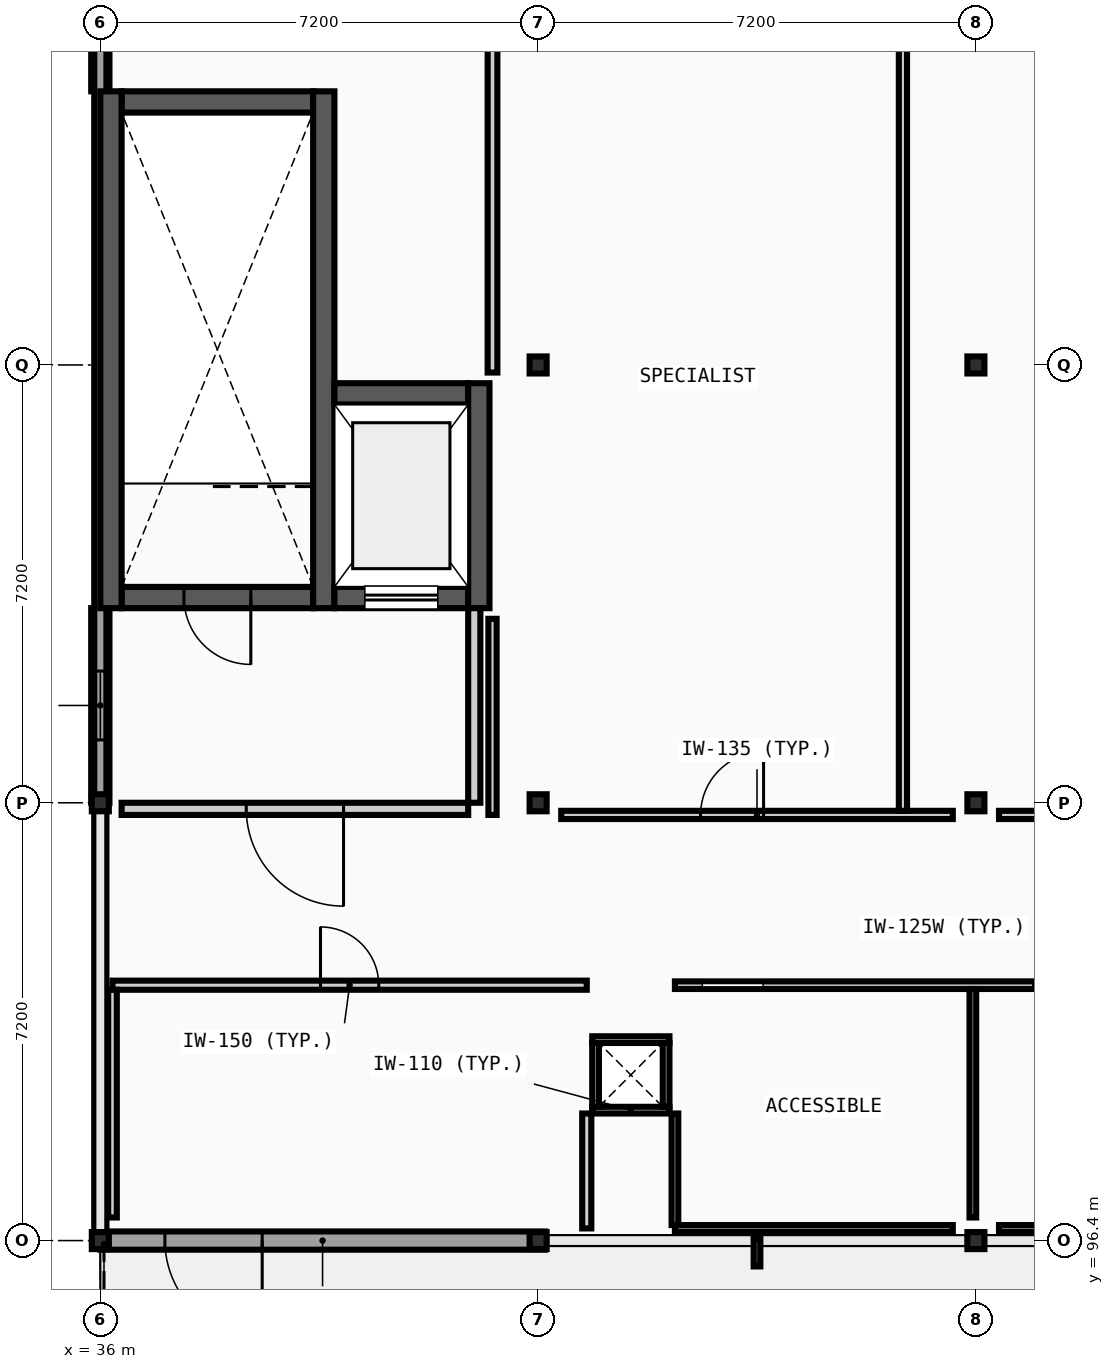
"""IFC4 building model, lengths in metres.
Left out: names, types, materials, properties, quantities, classifications, styles, units other than length and angle.
Written with IfcOpenShell. Run it as: python <this file> out.ifc"""

import sys

from ifc_helpers import new_model, si_unit, direction, frame, frame_2d, origin, origin_2d, place, context, subcontext, project, spatial, rectangle, i_section, extrude, element, fill, save


model = new_model("IFC4")
c1 = context("Model", 3, precision=1e-05, world=origin(), true_north=direction((0.0, 1.0)))
c2 = subcontext(c1, "Body", "Model", "MODEL_VIEW")
j1 = project(units=[si_unit("LENGTHUNIT", "METRE"), si_unit("PLANEANGLEUNIT", "RADIAN")], contexts=[c1])
p1 = place(None, origin())
s1 = spatial("IfcSite", under=j1, at=p1, CompositionType="ELEMENT")
p2 = place(p1, origin())
s2 = spatial("IfcBuilding", under=s1, at=p2, CompositionType="ELEMENT")
p3 = place(p2, frame((0.0, 0.0, 22.8)))
s3 = spatial("IfcBuildingStorey", under=s2, at=p3, CompositionType="ELEMENT", Elevation=22.8)
for number, where, z_axis, x_axis in (
    (1, (36.0, 96.4, 0.0), (0.0, 0.0, 1.0), (1.0, 0.0, 0.0)),
    (2, (36.0, 103.6, 0.0), (0.0, 0.0, 1.0), (1.0, 0.0, 0.0)),
    (3, (43.2, 96.4, 0.0), (0.0, 0.0, 1.0), (1.0, 0.0, 0.0)),
    (4, (43.2, 103.6, 0.0), (0.0, 0.0, 1.0), (1.0, 0.0, 0.0)),
    (5, (43.2, 110.8, 0.0), (0.0, 0.0, 1.0), (1.0, 0.0, 0.0)),
    (6, (50.4, 96.4, 0.0), (0.0, 0.0, 1.0), (1.0, 0.0, 0.0)),
    (7, (50.4, 103.6, 0.0), (0.0, 0.0, 1.0), (1.0, 0.0, 0.0)),
    (8, (50.4, 110.8, 0.0), (0.0, 0.0, 1.0), (1.0, 0.0, 0.0)),
):
    element("IfcColumn", number, at=place(p3, frame(where, z_axis=z_axis, x_axis=x_axis)), inside=s3, PredefinedType="COLUMN", context=c2, shape_type="SweptSolid", body=[
        extrude(i_section(OverallWidth=0.28, OverallDepth=0.28, WebThickness=0.01, FlangeThickness=0.018, FilletRadius=0.024, at=origin_2d()), origin(), (0.0, 0.0, 1.0), 4.4),
    ])
p4 = place(p3, frame((36.0, 96.4, 0.0), z_axis=(0.0, 0.0, 1.0), x_axis=(1.0, 0.0, 0.0)))
e9 = element("IfcWall", 9, at=p4, inside=s3, PredefinedType="STANDARD", context=c2, shape_type="SweptSolid", body=[
    extrude(rectangle(XDim=7.31, YDim=0.3, at=frame_2d((3.655, 0.0))), origin(), (0.0, 0.0, 1.0), 4.035),
])
p5 = place(p4, frame((1.062, 0.0, 0.0)))
e10 = element("IfcOpeningElement", 10, at=p5, cuts=e9, PredefinedType="OPENING", context=c2, shape_type="SweptSolid", body=[
    extrude(rectangle(XDim=1.6, YDim=2.2, at=frame_2d((0.8, 1.1))), frame((0.0, 0.16, 0.0), z_axis=(0.0, -1.0, 0.0), x_axis=(1.0, 0.0, 0.0)), (0.0, 0.0, 1.0), 0.32),
])
p6 = place(p3, frame((36.0, 106.8, 0.0), z_axis=(0.0, 0.0, 1.0), x_axis=(0.0, -1.0, 0.0)))
e11 = element("IfcWall", 11, at=p6, inside=s3, PredefinedType="STANDARD", context=c2, shape_type="SweptSolid", body=[
    extrude(rectangle(XDim=3.2, YDim=0.3, at=frame_2d((1.6, 0.0))), origin(), (0.0, 0.0, 1.0), 4.11),
])
p7 = place(p6, frame((1.034, 0.0, 0.95)))
e12 = element("IfcOpeningElement", 12, at=p7, cuts=e11, PredefinedType="OPENING", context=c2, shape_type="SweptSolid", body=[
    extrude(rectangle(XDim=1.132, YDim=1.296, at=frame_2d((0.566, 0.648))), frame((0.0, 0.16, 0.0), z_axis=(0.0, -1.0, 0.0), x_axis=(1.0, 0.0, 0.0)), (0.0, 0.0, 1.0), 0.32),
])
p8 = place(p3, frame((36.0, 117.85, 0.0), z_axis=(0.0, 0.0, 1.0), x_axis=(0.0, -1.0, 0.0)))
e13 = element("IfcWall", 13, at=p8, inside=s3, PredefinedType="STANDARD", context=c2, shape_type="SweptSolid", body=[
    extrude(rectangle(XDim=2.55, YDim=0.3, at=frame_2d((1.275, 0.0))), origin(), (0.0, 0.0, 1.0), 4.11),
])
p9 = place(p3, frame((36.0, 96.6, 4.4), z_axis=(0.0, 0.0, 1.0), x_axis=(0.0, 1.0, 0.0)))
e14 = element("IfcWall", 14, at=p9, inside=s3, PredefinedType="PARAPET", context=c2, shape_type="SweptSolid", body=[
    extrude(rectangle(XDim=21.2, YDim=0.2, at=frame_2d((10.6, 0.0))), origin(), (0.0, 0.0, 1.0), 0.55),
])
p10 = place(p3, frame((36.35, 106.975, 0.0), z_axis=(0.0, 0.0, 1.0), x_axis=(1.0, 0.0, 0.0)))
e15 = element("IfcWall", 15, at=p10, inside=s3, PredefinedType="SHEAR", context=c2, shape_type="SweptSolid", body=[
    extrude(rectangle(XDim=3.15, YDim=0.35, at=frame_2d((1.575, 0.0))), origin(), (0.0, 0.0, 1.0), 4.18),
])
p11 = place(p10, frame((1.025, 0.0, 0.0)))
e16 = element("IfcOpeningElement", 16, at=p11, cuts=e15, PredefinedType="OPENING", context=c2, shape_type="SweptSolid", body=[
    extrude(rectangle(XDim=1.1, YDim=2.15, at=frame_2d((0.55, 1.075))), frame((0.0, 0.185, 0.0), z_axis=(0.0, -1.0, 0.0), x_axis=(1.0, 0.0, 0.0)), (0.0, 0.0, 1.0), 0.37),
])
p12 = place(p3, frame((36.35, 115.125, 0.0), z_axis=(0.0, 0.0, 1.0), x_axis=(1.0, 0.0, 0.0)))
e17 = element("IfcWall", 17, at=p12, inside=s3, PredefinedType="SHEAR", context=c2, shape_type="SweptSolid", body=[
    extrude(rectangle(XDim=3.15, YDim=0.35, at=frame_2d((1.575, 0.0))), origin(), (0.0, 0.0, 1.0), 4.18),
])
for number, where, z_axis, x_axis in (
    (18, (36.175, 106.8, 0.0), (0.0, 0.0, 1.0), (0.0, 1.0, 0.0)),
    (19, (39.675, 106.8, 0.0), (0.0, 0.0, 1.0), (0.0, 1.0, 0.0)),
):
    element("IfcWall", number, at=place(p3, frame(where, z_axis=z_axis, x_axis=x_axis)), inside=s3, PredefinedType="SHEAR", context=c2, shape_type="SweptSolid", body=[
        extrude(rectangle(XDim=8.5, YDim=0.35, at=frame_2d((4.25, 0.0))), origin(), (0.0, 0.0, 1.0), 4.18),
    ])
p13 = place(p3, frame((39.85, 106.975, 0.0), z_axis=(0.0, 0.0, 1.0), x_axis=(1.0, 0.0, 0.0)))
e20 = element("IfcWall", 20, at=p13, inside=s3, PredefinedType="SHEAR", context=c2, shape_type="SweptSolid", body=[
    extrude(rectangle(XDim=2.2, YDim=0.35, at=frame_2d((1.1, 0.0))), origin(), (0.0, 0.0, 1.0), 4.18),
])
p14 = place(p13, frame((0.5, 0.0, 0.0)))
e21 = element("IfcOpeningElement", 21, at=p14, cuts=e20, PredefinedType="OPENING", context=c2, shape_type="SweptSolid", body=[
    extrude(rectangle(XDim=1.2, YDim=2.2, at=frame_2d((0.6, 1.1))), frame((0.0, 0.185, 0.0), z_axis=(0.0, -1.0, 0.0), x_axis=(1.0, 0.0, 0.0)), (0.0, 0.0, 1.0), 0.37),
])
p15 = place(p3, frame((39.85, 110.325, 0.0), z_axis=(0.0, 0.0, 1.0), x_axis=(1.0, 0.0, 0.0)))
e22 = element("IfcWall", 22, at=p15, inside=s3, PredefinedType="SHEAR", context=c2, shape_type="SweptSolid", body=[
    extrude(rectangle(XDim=2.2, YDim=0.35, at=frame_2d((1.1, 0.0))), origin(), (0.0, 0.0, 1.0), 4.18),
])
p16 = place(p3, frame((42.225, 106.8, 0.0), z_axis=(0.0, 0.0, 1.0), x_axis=(0.0, 1.0, 0.0)))
e23 = element("IfcWall", 23, at=p16, inside=s3, PredefinedType="SHEAR", context=c2, shape_type="SweptSolid", body=[
    extrude(rectangle(XDim=3.7, YDim=0.35, at=frame_2d((1.85, 0.0))), origin(), (0.0, 0.0, 1.0), 4.18),
])
p17 = place(p3, frame((36.35, 103.5, 0.0), z_axis=(0.0, 0.0, 1.0), x_axis=(1.0, 0.0, 0.0)))
e24 = element("IfcWall", 24, at=p17, inside=s3, PredefinedType="PARTITIONING", context=c2, shape_type="SweptSolid", body=[
    extrude(rectangle(XDim=5.7, YDim=0.2, at=frame_2d((2.85, 0.0))), origin(), (0.0, 0.0, 1.0), 4.035),
])
p18 = place(p17, frame((2.05, 0.0, 0.0)))
e25 = element("IfcOpeningElement", 25, at=p18, cuts=e24, PredefinedType="OPENING", context=c2, shape_type="SweptSolid", body=[
    extrude(rectangle(XDim=1.6, YDim=2.2, at=frame_2d((0.8, 1.1))), frame((0.0, 0.11, 0.0), z_axis=(0.0, -1.0, 0.0), x_axis=(1.0, 0.0, 0.0)), (0.0, 0.0, 1.0), 0.22),
])
p19 = place(p3, frame((42.15, 103.6, 0.0), z_axis=(0.0, 0.0, 1.0), x_axis=(0.0, 1.0, 0.0)))
e26 = element("IfcWall", 26, at=p19, inside=s3, PredefinedType="PARTITIONING", context=c2, shape_type="SweptSolid", body=[
    extrude(rectangle(XDim=3.2, YDim=0.2, at=frame_2d((1.6, 0.0))), origin(), (0.0, 0.0, 1.0), 4.18),
])
for number, where, z_axis, x_axis in (
    (27, (44.09, 98.545, 0.0), (0.0, 0.0, 1.0), (1.0, 0.0, 0.0)),
    (28, (44.09, 99.705, 0.0), (0.0, 0.0, 1.0), (1.0, 0.0, 0.0)),
):
    element("IfcWall", number, at=place(p3, frame(where, z_axis=z_axis, x_axis=x_axis)), inside=s3, PredefinedType="PARTITIONING", context=c2, shape_type="SweptSolid", body=[
        extrude(rectangle(XDim=1.27, YDim=0.11, at=frame_2d((0.635, 0.0))), origin(), (0.0, 0.0, 1.0), 4.18),
    ])
for number, where, z_axis, x_axis in (
    (29, (44.145, 98.6, 0.0), (0.0, 0.0, 1.0), (0.0, 1.0, 0.0)),
    (30, (45.305, 98.6, 0.0), (0.0, 0.0, 1.0), (0.0, 1.0, 0.0)),
):
    element("IfcWall", number, at=place(p3, frame(where, z_axis=z_axis, x_axis=x_axis)), inside=s3, PredefinedType="PARTITIONING", context=c2, shape_type="SweptSolid", body=[
        extrude(rectangle(XDim=1.05, YDim=0.11, at=frame_2d((0.525, 0.0))), origin(), (0.0, 0.0, 1.0), 4.18),
    ])
p20 = place(p3, frame((45.45, 96.6, 0.0), z_axis=(0.0, 0.0, 1.0), x_axis=(1.0, 0.0, 0.0)))
e31 = element("IfcWall", 31, at=p20, inside=s3, PredefinedType="PARTITIONING", context=c2, shape_type="SweptSolid", body=[
    extrude(rectangle(XDim=4.57, YDim=0.11, at=frame_2d((2.285, 0.0))), origin(), (0.0, 0.0, 1.0), 4.035),
])
p21 = place(p3, frame((50.78, 96.6, 0.0), z_axis=(0.0, 0.0, 1.0), x_axis=(1.0, 0.0, 0.0)))
e32 = element("IfcWall", 32, at=p21, inside=s3, PredefinedType="PARTITIONING", context=c2, shape_type="SweptSolid", body=[
    extrude(rectangle(XDim=6.44, YDim=0.11, at=frame_2d((3.22, 0.0))), origin(), (0.0, 0.0, 1.0), 4.035),
])
p22 = place(p3, frame((36.2, 100.6, 0.0), z_axis=(0.0, 0.0, 1.0), x_axis=(1.0, 0.0, 0.0)))
e33 = element("IfcWall", 33, at=p22, inside=s3, PredefinedType="PARTITIONING", context=c2, shape_type="SweptSolid", body=[
    extrude(rectangle(XDim=7.8, YDim=0.15, at=frame_2d((3.9, 0.0))), origin(), (0.0, 0.0, 1.0), 4.18),
])
p23 = place(p22, frame((3.421, 0.0, 0.0)))
e34 = element("IfcOpeningElement", 34, at=p23, cuts=e33, PredefinedType="OPENING", context=c2, shape_type="SweptSolid", body=[
    extrude(rectangle(XDim=0.958, YDim=2.096, at=frame_2d((0.479, 1.048))), frame((0.0, 0.085, 0.0), z_axis=(0.0, -1.0, 0.0), x_axis=(1.0, 0.0, 0.0)), (0.0, 0.0, 1.0), 0.17),
])
p24 = place(p3, frame((45.45, 100.6, 0.0), z_axis=(0.0, 0.0, 1.0), x_axis=(1.0, 0.0, 0.0)))
e35 = element("IfcWall", 35, at=p24, inside=s3, PredefinedType="PARTITIONING", context=c2, shape_type="SweptSolid", body=[
    extrude(rectangle(XDim=19.15, YDim=0.125, at=frame_2d((9.575, 0.0))), origin(), (0.0, 0.0, 1.0), 4.18),
])
p25 = place(p24, frame((0.45, 0.0, 0.0)))
e36 = element("IfcOpeningElement", 36, at=p25, cuts=e35, PredefinedType="OPENING", context=c2, shape_type="SweptSolid", body=[
    extrude(rectangle(XDim=1.0, YDim=2.1, at=frame_2d((0.5, 1.05))), frame((0.0, 0.073, 0.0), z_axis=(0.0, -1.0, 0.0), x_axis=(1.0, 0.0, 0.0)), (0.0, 0.0, 1.0), 0.145),
])
p26 = place(p24, frame((7.675, 0.0, 0.0)))
e37 = element("IfcOpeningElement", 37, at=p26, cuts=e35, PredefinedType="OPENING", context=c2, shape_type="SweptSolid", body=[
    extrude(rectangle(XDim=0.9, YDim=2.1, at=frame_2d((0.45, 1.05))), frame((0.0, 0.073, 0.0), z_axis=(0.0, -1.0, 0.0), x_axis=(1.0, 0.0, 0.0)), (0.0, 0.0, 1.0), 0.145),
])
p27 = place(p24, frame((14.758, 0.0, 0.0)))
e38 = element("IfcOpeningElement", 38, at=p27, cuts=e35, PredefinedType="OPENING", context=c2, shape_type="SweptSolid", body=[
    extrude(rectangle(XDim=0.984, YDim=2.096, at=frame_2d((0.492, 1.048))), frame((0.0, 0.073, 0.0), z_axis=(0.0, -1.0, 0.0), x_axis=(1.0, 0.0, 0.0)), (0.0, 0.0, 1.0), 0.145),
])
p28 = place(p3, frame((43.58, 103.4, 0.0), z_axis=(0.0, 0.0, 1.0), x_axis=(1.0, 0.0, 0.0)))
e39 = element("IfcWall", 39, at=p28, inside=s3, PredefinedType="PARTITIONING", context=c2, shape_type="SweptSolid", body=[
    extrude(rectangle(XDim=6.44, YDim=0.135, at=frame_2d((3.22, 0.0))), origin(), (0.0, 0.0, 1.0), 4.035),
])
p29 = place(p28, frame((2.292, 0.0, 0.0)))
e40 = element("IfcOpeningElement", 40, at=p29, cuts=e39, PredefinedType="OPENING", context=c2, shape_type="SweptSolid", body=[
    extrude(rectangle(XDim=1.036, YDim=2.096, at=frame_2d((0.518, 1.048))), frame((0.0, 0.078, 0.0), z_axis=(0.0, -1.0, 0.0), x_axis=(1.0, 0.0, 0.0)), (0.0, 0.0, 1.0), 0.155),
])
p30 = place(p3, frame((50.78, 103.4, 0.0), z_axis=(0.0, 0.0, 1.0), x_axis=(1.0, 0.0, 0.0)))
e41 = element("IfcWall", 41, at=p30, inside=s3, PredefinedType="PARTITIONING", context=c2, shape_type="SweptSolid", body=[
    extrude(rectangle(XDim=6.44, YDim=0.135, at=frame_2d((3.22, 0.0))), origin(), (0.0, 0.0, 1.0), 4.035),
])
p31 = place(p30, frame((4.105, 0.0, 0.0)))
e42 = element("IfcOpeningElement", 42, at=p31, cuts=e41, PredefinedType="OPENING", context=c2, shape_type="SweptSolid", body=[
    extrude(rectangle(XDim=1.8, YDim=2.3, at=frame_2d((0.9, 1.15))), frame((0.0, 0.078, 0.0), z_axis=(0.0, -1.0, 0.0), x_axis=(1.0, 0.0, 0.0)), (0.0, 0.0, 1.0), 0.155),
])
p32 = place(p30, frame((2.11, 0.0, 0.0)))
e43 = element("IfcOpeningElement", 43, at=p32, cuts=e41, PredefinedType="OPENING", context=c2, shape_type="SweptSolid", body=[
    extrude(rectangle(XDim=1.01, YDim=2.096, at=frame_2d((0.505, 1.048))), frame((0.0, 0.078, 0.0), z_axis=(0.0, -1.0, 0.0), x_axis=(1.0, 0.0, 0.0)), (0.0, 0.0, 1.0), 0.155),
])
p33 = place(p3, frame((36.2, 96.78, 0.0), z_axis=(0.0, 0.0, 1.0), x_axis=(0.0, 1.0, 0.0)))
e44 = element("IfcWall", 44, at=p33, inside=s3, PredefinedType="PARTITIONING", context=c2, shape_type="SweptSolid", body=[
    extrude(rectangle(XDim=3.745, YDim=0.142, at=frame_2d((1.873, 0.0))), origin(), (0.0, 0.0, 1.0), 4.11),
])
p34 = place(p3, frame((42.45, 103.4, 0.0), z_axis=(0.0, 0.0, 1.0), x_axis=(0.0, 1.0, 0.0)))
e45 = element("IfcWall", 45, at=p34, inside=s3, PredefinedType="PARTITIONING", context=c2, shape_type="SweptSolid", body=[
    extrude(rectangle(XDim=3.225, YDim=0.135, at=frame_2d((1.613, 0.0))), origin(), (0.0, 0.0, 1.0), 4.18),
])
p35 = place(p3, frame((42.45, 110.675, 0.0), z_axis=(0.0, 0.0, 1.0), x_axis=(0.0, 1.0, 0.0)))
e46 = element("IfcWall", 46, at=p35, inside=s3, PredefinedType="PARTITIONING", context=c2, shape_type="SweptSolid", body=[
    extrude(rectangle(XDim=7.125, YDim=0.16, at=frame_2d((3.562, 0.0))), origin(), (0.0, 0.0, 1.0), 4.18),
])
p36 = place(p3, frame((44.0, 96.6, 0.0), z_axis=(0.0, 0.0, 1.0), x_axis=(0.0, 1.0, 0.0)))
e47 = element("IfcWall", 47, at=p36, inside=s3, PredefinedType="PARTITIONING", context=c2, shape_type="SweptSolid", body=[
    extrude(rectangle(XDim=1.89, YDim=0.15, at=frame_2d((0.945, 0.0))), origin(), (0.0, 0.0, 1.0), 4.18),
])
p37 = place(p3, frame((45.45, 96.655, 0.0), z_axis=(0.0, 0.0, 1.0), x_axis=(0.0, 1.0, 0.0)))
e48 = element("IfcWall", 48, at=p37, inside=s3, PredefinedType="PARTITIONING", context=c2, shape_type="SweptSolid", body=[
    extrude(rectangle(XDim=1.835, YDim=0.11, at=frame_2d((0.917, 0.0))), origin(), (0.0, 0.0, 1.0), 4.18),
])
p38 = place(p3, frame((49.2, 103.468, 0.0), z_axis=(0.0, 0.0, 1.0), x_axis=(0.0, 1.0, 0.0)))
e49 = element("IfcWall", 49, at=p38, inside=s3, PredefinedType="PARTITIONING", context=c2, shape_type="SweptSolid", body=[
    extrude(rectangle(XDim=14.333, YDim=0.135, at=frame_2d((7.166, 0.0))), origin(), (0.0, 0.0, 1.0), 4.18),
])
p39 = place(p3, frame((50.35, 96.78, 0.0), z_axis=(0.0, 0.0, 1.0), x_axis=(0.0, 1.0, 0.0)))
e50 = element("IfcWall", 50, at=p39, inside=s3, PredefinedType="PARTITIONING", context=c2, shape_type="SweptSolid", body=[
    extrude(rectangle(XDim=3.758, YDim=0.11, at=frame_2d((1.879, 0.0))), origin(), (0.0, 0.0, 1.0), 4.18),
])
p40 = place(p7, origin())
e51 = element("IfcWindow", 51, at=p40, inside=s3, PartitioningType="SINGLE_PANEL", PredefinedType="WINDOW", context=c2, shape_type="SweptSolid", body=[
    extrude(rectangle(XDim=1.132, YDim=1.296, at=frame_2d((0.566, 0.648))), frame((0.0, 0.03, 0.0), z_axis=(0.0, -1.0, 0.0), x_axis=(1.0, 0.0, 0.0)), (0.0, 0.0, 1.0), 0.06),
])
fill(e12, e51)
p41 = place(p5, origin())
e52 = element("IfcDoor", 52, at=p41, inside=s3, OperationType="DOUBLE_DOOR_SINGLE_SWING", PredefinedType="DOOR", context=c2, shape_type="SweptSolid", body=[
    extrude(rectangle(XDim=1.6, YDim=2.2, at=frame_2d((0.8, 1.1))), frame((0.0, 0.025, 0.0), z_axis=(0.0, -1.0, 0.0), x_axis=(1.0, 0.0, 0.0)), (0.0, 0.0, 1.0), 0.05),
])
fill(e10, e52)
p42 = place(p11, origin())
e53 = element("IfcDoor", 53, at=p42, inside=s3, OperationType="SINGLE_SWING_RIGHT", PredefinedType="DOOR", context=c2, shape_type="SweptSolid", body=[
    extrude(rectangle(XDim=1.1, YDim=2.15, at=frame_2d((0.55, 1.075))), frame((0.0, 0.025, 0.0), z_axis=(0.0, -1.0, 0.0), x_axis=(1.0, 0.0, 0.0)), (0.0, 0.0, 1.0), 0.05),
])
fill(e16, e53)
p43 = place(p14, origin())
e54 = element("IfcDoor", 54, at=p43, inside=s3, OperationType="SLIDING_TO_RIGHT", PredefinedType="DOOR", context=c2, shape_type="SweptSolid", body=[
    extrude(rectangle(XDim=1.2, YDim=2.2, at=frame_2d((0.6, 1.1))), frame((0.0, 0.025, 0.0), z_axis=(0.0, -1.0, 0.0), x_axis=(1.0, 0.0, 0.0)), (0.0, 0.0, 1.0), 0.05),
])
fill(e21, e54)
p44 = place(p18, origin())
e55 = element("IfcDoor", 55, at=p44, inside=s3, OperationType="DOUBLE_DOOR_SINGLE_SWING", PredefinedType="DOOR", context=c2, shape_type="SweptSolid", body=[
    extrude(rectangle(XDim=1.6, YDim=2.2, at=frame_2d((0.8, 1.1))), frame((0.0, 0.025, 0.0), z_axis=(0.0, -1.0, 0.0), x_axis=(1.0, 0.0, 0.0)), (0.0, 0.0, 1.0), 0.05),
])
fill(e25, e55)
p45 = place(p25, origin())
e56 = element("IfcDoor", 56, at=p45, inside=s3, OperationType="SLIDING_TO_LEFT", PredefinedType="DOOR", context=c2, shape_type="SweptSolid", body=[
    extrude(rectangle(XDim=1.0, YDim=2.1, at=frame_2d((0.5, 1.05))), frame((0.0, 0.025, 0.0), z_axis=(0.0, -1.0, 0.0), x_axis=(1.0, 0.0, 0.0)), (0.0, 0.0, 1.0), 0.05),
])
fill(e36, e56)
p46 = place(p23, origin())
e57 = element("IfcDoor", 57, at=p46, inside=s3, OperationType="SINGLE_SWING_LEFT", PredefinedType="DOOR", context=c2, shape_type="SweptSolid", body=[
    extrude(rectangle(XDim=0.958, YDim=2.096, at=frame_2d((0.479, 1.048))), frame((0.0, 0.025, 0.0), z_axis=(0.0, -1.0, 0.0), x_axis=(1.0, 0.0, 0.0)), (0.0, 0.0, 1.0), 0.05),
])
fill(e34, e57)
p47 = place(p29, frame((1.036, 0.0, 0.0), z_axis=(0.0, 0.0, 1.0), x_axis=(-1.0, 0.0, 0.0)))
e58 = element("IfcDoor", 58, at=p47, inside=s3, OperationType="SINGLE_SWING_RIGHT", PredefinedType="DOOR", context=c2, shape_type="SweptSolid", body=[
    extrude(rectangle(XDim=1.036, YDim=2.096, at=frame_2d((0.518, 1.048))), frame((0.0, 0.025, 0.0), z_axis=(0.0, -1.0, 0.0), x_axis=(1.0, 0.0, 0.0)), (0.0, 0.0, 1.0), 0.05),
])
fill(e40, e58)
save(model, sys.argv[1])
